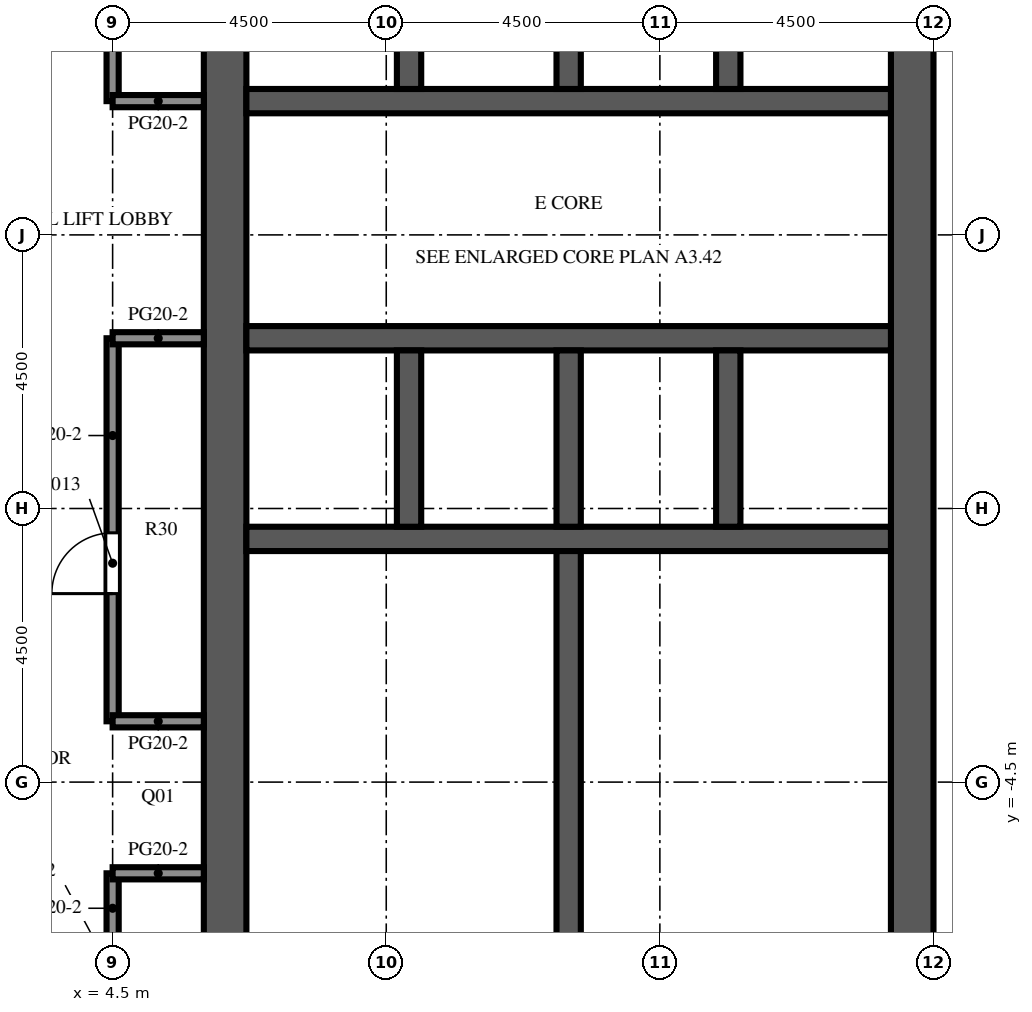
"""IFC4 building model, lengths in metres.
Left out: names, types, materials, properties, quantities, classifications, styles, units other than length and angle.
Written with IfcOpenShell. Run it as: python <this file> out.ifc"""

import sys

from ifc_helpers import new_model, si_unit, direction, frame, frame_2d, origin, place, context, subcontext, project, spatial, rectangle, extrude, element, fill, save


model = new_model("IFC4")
c1 = context("Model", 3, precision=1e-05, world=origin(), true_north=direction((0.0, 1.0)))
c2 = subcontext(c1, "Body", "Model", "MODEL_VIEW")
j1 = project(units=[si_unit("LENGTHUNIT", "METRE"), si_unit("PLANEANGLEUNIT", "RADIAN")], contexts=[c1])
p1 = place(None, origin())
s1 = spatial("IfcSite", under=j1, at=p1, CompositionType="ELEMENT")
p2 = place(p1, origin())
s2 = spatial("IfcBuilding", under=s1, at=p2, CompositionType="ELEMENT")
p3 = place(p2, frame((0.0, 0.0, 290.9)))
s3 = spatial("IfcBuildingStorey", under=s2, at=p3, CompositionType="ELEMENT", Elevation=290.9)
p4 = place(p3, frame((6.35, -9.0, 0.0), z_axis=(0.0, 0.0, 1.0), x_axis=(0.0, 1.0, 0.0)))
e1 = element("IfcWall", 1, at=p4, inside=s3, PredefinedType="SHEAR", context=c2, shape_type="SweptSolid", body=[
    extrude(rectangle(XDim=27.5, YDim=0.7, at=frame_2d((13.75, 0.0))), origin(), (0.0, 0.0, 1.0), 4.1),
])
p5 = place(p4, frame((12.55, 0.0, 0.0)))
e2 = element("IfcOpeningElement", 2, at=p5, cuts=e1, PredefinedType="OPENING", context=c2, shape_type="SweptSolid", body=[
    extrude(rectangle(XDim=2.4, YDim=2.4, at=frame_2d((1.2, 1.2))), frame((0.0, 0.36, 0.0), z_axis=(0.0, -1.0, 0.0), x_axis=(1.0, 0.0, 0.0)), (0.0, 0.0, 1.0), 0.72),
])
p6 = place(p4, frame((3.9, 0.0, 0.0)))
e3 = element("IfcOpeningElement", 3, at=p6, cuts=e1, PredefinedType="OPENING", context=c2, shape_type="SweptSolid", body=[
    extrude(rectangle(XDim=1.2, YDim=2.1, at=frame_2d((0.6, 1.05))), frame((0.0, 0.36, 0.0), z_axis=(0.0, -1.0, 0.0), x_axis=(1.0, 0.0, 0.0)), (0.0, 0.0, 1.0), 0.72),
])
p7 = place(p4, frame((22.4, 0.0, 0.0)))
e4 = element("IfcOpeningElement", 4, at=p7, cuts=e1, PredefinedType="OPENING", context=c2, shape_type="SweptSolid", body=[
    extrude(rectangle(XDim=1.2, YDim=2.1, at=frame_2d((0.6, 1.05))), frame((0.0, 0.36, 0.0), z_axis=(0.0, -1.0, 0.0), x_axis=(1.0, 0.0, 0.0)), (0.0, 0.0, 1.0), 0.72),
])
p8 = place(p3, frame((17.65, -9.0, 0.0), z_axis=(0.0, 0.0, 1.0), x_axis=(0.0, 1.0, 0.0)))
e5 = element("IfcWall", 5, at=p8, inside=s3, PredefinedType="SHEAR", context=c2, shape_type="SweptSolid", body=[
    extrude(rectangle(XDim=27.5, YDim=0.7, at=frame_2d((13.75, 0.0))), origin(), (0.0, 0.0, 1.0), 4.1),
])
p9 = place(p8, frame((12.55, 0.0, 0.0)))
e6 = element("IfcOpeningElement", 6, at=p9, cuts=e5, PredefinedType="OPENING", context=c2, shape_type="SweptSolid", body=[
    extrude(rectangle(XDim=2.4, YDim=2.4, at=frame_2d((1.2, 1.2))), frame((0.0, 0.36, 0.0), z_axis=(0.0, -1.0, 0.0), x_axis=(1.0, 0.0, 0.0)), (0.0, 0.0, 1.0), 0.72),
])
p10 = place(p8, frame((6.825, 0.0, 0.0)))
e7 = element("IfcOpeningElement", 7, at=p10, cuts=e5, PredefinedType="OPENING", context=c2, shape_type="SweptSolid", body=[
    extrude(rectangle(XDim=1.2, YDim=2.1, at=frame_2d((0.6, 1.05))), frame((0.0, 0.36, 0.0), z_axis=(0.0, -1.0, 0.0), x_axis=(1.0, 0.0, 0.0)), (0.0, 0.0, 1.0), 0.72),
])
p11 = place(p8, frame((19.475, 0.0, 0.0)))
e8 = element("IfcOpeningElement", 8, at=p11, cuts=e5, PredefinedType="OPENING", context=c2, shape_type="SweptSolid", body=[
    extrude(rectangle(XDim=1.2, YDim=2.1, at=frame_2d((0.6, 1.05))), frame((0.0, 0.36, 0.0), z_axis=(0.0, -1.0, 0.0), x_axis=(1.0, 0.0, 0.0)), (0.0, 0.0, 1.0), 0.72),
])
p12 = place(p3, frame((6.7, -0.5, 0.0), z_axis=(0.0, 0.0, 1.0), x_axis=(1.0, 0.0, 0.0)))
e9 = element("IfcWall", 9, at=p12, inside=s3, PredefinedType="SHEAR", context=c2, shape_type="SweptSolid", body=[
    extrude(rectangle(XDim=10.6, YDim=0.4, at=frame_2d((5.3, 0.0))), origin(), (0.0, 0.0, 1.0), 4.1),
])
p13 = place(p3, frame((6.7, 2.8, 0.0), z_axis=(0.0, 0.0, 1.0), x_axis=(1.0, 0.0, 0.0)))
e10 = element("IfcWall", 10, at=p13, inside=s3, PredefinedType="SHEAR", context=c2, shape_type="SweptSolid", body=[
    extrude(rectangle(XDim=10.6, YDim=0.4, at=frame_2d((5.3, 0.0))), origin(), (0.0, 0.0, 1.0), 4.1),
])
p14 = place(p13, frame((0.688, 0.0, 0.0)))
e11 = element("IfcOpeningElement", 11, at=p14, cuts=e10, PredefinedType="OPENING", context=c2, shape_type="SweptSolid", body=[
    extrude(rectangle(XDim=1.1, YDim=2.1, at=frame_2d((0.55, 1.05))), frame((0.0, 0.21, 0.0), z_axis=(0.0, -1.0, 0.0), x_axis=(1.0, 0.0, 0.0)), (0.0, 0.0, 1.0), 0.42),
])
p15 = place(p13, frame((3.438, 0.0, 0.0)))
e12 = element("IfcOpeningElement", 12, at=p15, cuts=e10, PredefinedType="OPENING", context=c2, shape_type="SweptSolid", body=[
    extrude(rectangle(XDim=1.1, YDim=2.1, at=frame_2d((0.55, 1.05))), frame((0.0, 0.21, 0.0), z_axis=(0.0, -1.0, 0.0), x_axis=(1.0, 0.0, 0.0)), (0.0, 0.0, 1.0), 0.42),
])
p16 = place(p13, frame((6.113, 0.0, 0.0)))
e13 = element("IfcOpeningElement", 13, at=p16, cuts=e10, PredefinedType="OPENING", context=c2, shape_type="SweptSolid", body=[
    extrude(rectangle(XDim=1.0, YDim=2.1, at=frame_2d((0.5, 1.05))), frame((0.0, 0.21, 0.0), z_axis=(0.0, -1.0, 0.0), x_axis=(1.0, 0.0, 0.0)), (0.0, 0.0, 1.0), 0.42),
])
p17 = place(p13, frame((8.863, 0.0, 0.0)))
e14 = element("IfcOpeningElement", 14, at=p17, cuts=e10, PredefinedType="OPENING", context=c2, shape_type="SweptSolid", body=[
    extrude(rectangle(XDim=1.0, YDim=2.1, at=frame_2d((0.5, 1.05))), frame((0.0, 0.21, 0.0), z_axis=(0.0, -1.0, 0.0), x_axis=(1.0, 0.0, 0.0)), (0.0, 0.0, 1.0), 0.42),
])
p18 = place(p3, frame((6.7, 6.7, 0.0), z_axis=(0.0, 0.0, 1.0), x_axis=(1.0, 0.0, 0.0)))
e15 = element("IfcWall", 15, at=p18, inside=s3, PredefinedType="SHEAR", context=c2, shape_type="SweptSolid", body=[
    extrude(rectangle(XDim=10.6, YDim=0.4, at=frame_2d((5.3, 0.0))), origin(), (0.0, 0.0, 1.0), 4.1),
])
p19 = place(p18, frame((3.438, 0.0, 0.0)))
e16 = element("IfcOpeningElement", 16, at=p19, cuts=e15, PredefinedType="OPENING", context=c2, shape_type="SweptSolid", body=[
    extrude(rectangle(XDim=1.1, YDim=2.1, at=frame_2d((0.55, 1.05))), frame((0.0, 0.21, 0.0), z_axis=(0.0, -1.0, 0.0), x_axis=(1.0, 0.0, 0.0)), (0.0, 0.0, 1.0), 0.42),
])
p20 = place(p18, frame((6.062, 0.0, 0.0)))
e17 = element("IfcOpeningElement", 17, at=p20, cuts=e15, PredefinedType="OPENING", context=c2, shape_type="SweptSolid", body=[
    extrude(rectangle(XDim=1.1, YDim=2.1, at=frame_2d((0.55, 1.05))), frame((0.0, 0.21, 0.0), z_axis=(0.0, -1.0, 0.0), x_axis=(1.0, 0.0, 0.0)), (0.0, 0.0, 1.0), 0.42),
])
p21 = place(p18, frame((8.812, 0.0, 0.0)))
e18 = element("IfcOpeningElement", 18, at=p21, cuts=e15, PredefinedType="OPENING", context=c2, shape_type="SweptSolid", body=[
    extrude(rectangle(XDim=1.1, YDim=2.1, at=frame_2d((0.55, 1.05))), frame((0.0, 0.21, 0.0), z_axis=(0.0, -1.0, 0.0), x_axis=(1.0, 0.0, 0.0)), (0.0, 0.0, 1.0), 0.42),
])
p22 = place(p18, frame((0.738, 0.0, 0.0)))
e19 = element("IfcOpeningElement", 19, at=p22, cuts=e15, PredefinedType="OPENING", context=c2, shape_type="SweptSolid", body=[
    extrude(rectangle(XDim=1.0, YDim=2.1, at=frame_2d((0.5, 1.05))), frame((0.0, 0.21, 0.0), z_axis=(0.0, -1.0, 0.0), x_axis=(1.0, 0.0, 0.0)), (0.0, 0.0, 1.0), 0.42),
])
for number, where, z_axis, x_axis in (
    (20, (9.375, -0.3, 0.0), (0.0, 0.0, 1.0), (0.0, 1.0, 0.0)),
    (21, (9.375, 6.9, 0.0), (0.0, 0.0, 1.0), (0.0, 1.0, 0.0)),
    (22, (12.0, -0.3, 0.0), (0.0, 0.0, 1.0), (0.0, 1.0, 0.0)),
    (23, (12.0, 6.9, 0.0), (0.0, 0.0, 1.0), (0.0, 1.0, 0.0)),
    (24, (14.625, -0.3, 0.0), (0.0, 0.0, 1.0), (0.0, 1.0, 0.0)),
    (25, (14.625, 6.9, 0.0), (0.0, 0.0, 1.0), (0.0, 1.0, 0.0)),
):
    element("IfcWall", number, at=place(p3, frame(where, z_axis=z_axis, x_axis=x_axis)), inside=s3, PredefinedType="SHEAR", context=c2, shape_type="SweptSolid", body=[
        extrude(rectangle(XDim=2.9, YDim=0.4, at=frame_2d((1.45, 0.0))), origin(), (0.0, 0.0, 1.0), 4.1),
    ])
p23 = place(p3, frame((12.0, -8.3, 0.0), z_axis=(0.0, 0.0, 1.0), x_axis=(0.0, 1.0, 0.0)))
e26 = element("IfcWall", 26, at=p23, inside=s3, PredefinedType="SHEAR", context=c2, shape_type="SweptSolid", body=[
    extrude(rectangle(XDim=7.6, YDim=0.4, at=frame_2d((3.8, 0.0))), origin(), (0.0, 0.0, 1.0), 4.1),
])
p24 = place(p3, frame((8.2, -8.3, 0.0), z_axis=(0.0, 0.0, 1.0), x_axis=(0.0, 1.0, 0.0)))
e27 = element("IfcWall", 27, at=p24, inside=s3, PredefinedType="PARTITIONING", context=c2, shape_type="SweptSolid", body=[
    extrude(rectangle(XDim=2.28, YDim=0.1, at=frame_2d((1.14, 0.0))), origin(), (0.0, 0.0, 1.0), 3.5),
])
p25 = place(p24, frame((0.64, 0.0, 0.0)))
e28 = element("IfcOpeningElement", 28, at=p25, cuts=e27, PredefinedType="OPENING", context=c2, shape_type="SweptSolid", body=[
    extrude(rectangle(XDim=1.0, YDim=2.1, at=frame_2d((0.5, 1.05))), frame((0.0, 0.06, 0.0), z_axis=(0.0, -1.0, 0.0), x_axis=(1.0, 0.0, 0.0)), (0.0, 0.0, 1.0), 0.12),
])
p26 = place(p3, frame((8.2, -6.02, 0.0), z_axis=(0.0, 0.0, 1.0), x_axis=(0.0, 1.0, 0.0)))
e29 = element("IfcWall", 29, at=p26, inside=s3, PredefinedType="PARTITIONING", context=c2, shape_type="SweptSolid", body=[
    extrude(rectangle(XDim=2.28, YDim=0.1, at=frame_2d((1.14, 0.0))), origin(), (0.0, 0.0, 1.0), 3.5),
])
p27 = place(p26, frame((0.64, 0.0, 0.0)))
e30 = element("IfcOpeningElement", 30, at=p27, cuts=e29, PredefinedType="OPENING", context=c2, shape_type="SweptSolid", body=[
    extrude(rectangle(XDim=1.0, YDim=2.1, at=frame_2d((0.5, 1.05))), frame((0.0, 0.06, 0.0), z_axis=(0.0, -1.0, 0.0), x_axis=(1.0, 0.0, 0.0)), (0.0, 0.0, 1.0), 0.12),
])
p28 = place(p3, frame((8.2, -3.74, 0.0), z_axis=(0.0, 0.0, 1.0), x_axis=(0.0, 1.0, 0.0)))
e31 = element("IfcWall", 31, at=p28, inside=s3, PredefinedType="PARTITIONING", context=c2, shape_type="SweptSolid", body=[
    extrude(rectangle(XDim=1.672, YDim=0.1, at=frame_2d((0.836, 0.0))), origin(), (0.0, 0.0, 1.0), 3.5),
])
p29 = place(p28, frame((0.336, 0.0, 0.0)))
e32 = element("IfcOpeningElement", 32, at=p29, cuts=e31, PredefinedType="OPENING", context=c2, shape_type="SweptSolid", body=[
    extrude(rectangle(XDim=1.0, YDim=2.1, at=frame_2d((0.5, 1.05))), frame((0.0, 0.06, 0.0), z_axis=(0.0, -1.0, 0.0), x_axis=(1.0, 0.0, 0.0)), (0.0, 0.0, 1.0), 0.12),
])
p30 = place(p3, frame((8.2, -2.068, 0.0), z_axis=(0.0, 0.0, 1.0), x_axis=(0.0, 1.0, 0.0)))
e33 = element("IfcWall", 33, at=p30, inside=s3, PredefinedType="PARTITIONING", context=c2, shape_type="SweptSolid", body=[
    extrude(rectangle(XDim=1.368, YDim=0.1, at=frame_2d((0.684, 0.0))), origin(), (0.0, 0.0, 1.0), 3.5),
])
p31 = place(p30, frame((0.2, 0.0, 0.0)))
e34 = element("IfcOpeningElement", 34, at=p31, cuts=e33, PredefinedType="OPENING", context=c2, shape_type="SweptSolid", body=[
    extrude(rectangle(XDim=0.968, YDim=2.1, at=frame_2d((0.484, 1.05))), frame((0.0, 0.06, 0.0), z_axis=(0.0, -1.0, 0.0), x_axis=(1.0, 0.0, 0.0)), (0.0, 0.0, 1.0), 0.12),
])
for number, where, z_axis, x_axis in (
    (35, (8.2, -6.02, 0.0), (0.0, 0.0, 1.0), (1.0, 0.0, 0.0)),
    (36, (8.2, -3.74, 0.0), (0.0, 0.0, 1.0), (1.0, 0.0, 0.0)),
    (37, (8.2, -2.068, 0.0), (0.0, 0.0, 1.0), (1.0, 0.0, 0.0)),
):
    element("IfcWall", number, at=place(p3, frame(where, z_axis=z_axis, x_axis=x_axis)), inside=s3, PredefinedType="PARTITIONING", context=c2, shape_type="SweptSolid", body=[
        extrude(rectangle(XDim=3.6, YDim=0.1, at=frame_2d((1.8, 0.0))), origin(), (0.0, 0.0, 1.0), 3.5),
    ])
p32 = place(p3, frame((4.5, -6.0, 0.0), z_axis=(0.0, 0.0, 1.0), x_axis=(0.0, -1.0, 0.0)))
e38 = element("IfcWall", 38, at=p32, inside=s3, PredefinedType="PARTITIONING", context=c2, shape_type="SweptSolid", body=[
    extrude(rectangle(XDim=2.5, YDim=0.2, at=frame_2d((1.25, 0.0))), origin(), (0.0, 0.0, 1.0), 3.5),
])
p33 = place(p32, frame((1.15, 0.0, 0.0)))
e39 = element("IfcOpeningElement", 39, at=p33, cuts=e38, PredefinedType="OPENING", context=c2, shape_type="SweptSolid", body=[
    extrude(rectangle(XDim=1.0, YDim=2.1, at=frame_2d((0.5, 1.05))), frame((0.0, 0.11, 0.0), z_axis=(0.0, -1.0, 0.0), x_axis=(1.0, 0.0, 0.0)), (0.0, 0.0, 1.0), 0.22),
])
p34 = place(p3, frame((4.5, 2.8, 0.0), z_axis=(0.0, 0.0, 1.0), x_axis=(0.0, -1.0, 0.0)))
e40 = element("IfcWall", 40, at=p34, inside=s3, PredefinedType="PARTITIONING", context=c2, shape_type="SweptSolid", body=[
    extrude(rectangle(XDim=6.3, YDim=0.2, at=frame_2d((3.15, 0.0))), origin(), (0.0, 0.0, 1.0), 3.5),
])
p35 = place(p34, frame((3.2, 0.0, 0.0)))
e41 = element("IfcOpeningElement", 41, at=p35, cuts=e40, PredefinedType="OPENING", context=c2, shape_type="SweptSolid", body=[
    extrude(rectangle(XDim=1.0, YDim=2.1, at=frame_2d((0.5, 1.05))), frame((0.0, 0.11, 0.0), z_axis=(0.0, -1.0, 0.0), x_axis=(1.0, 0.0, 0.0)), (0.0, 0.0, 1.0), 0.22),
])
p36 = place(p3, frame((4.5, 18.5, 0.0), z_axis=(0.0, 0.0, 1.0), x_axis=(0.0, -1.0, 0.0)))
e42 = element("IfcWall", 42, at=p36, inside=s3, PredefinedType="PARTITIONING", context=c2, shape_type="SweptSolid", body=[
    extrude(rectangle(XDim=11.8, YDim=0.2, at=frame_2d((5.9, 0.0))), origin(), (0.0, 0.0, 1.0), 3.5),
])
p37 = place(p36, frame((3.95, 0.0, 0.0)))
e43 = element("IfcOpeningElement", 43, at=p37, cuts=e42, PredefinedType="OPENING", context=c2, shape_type="SweptSolid", body=[
    extrude(rectangle(XDim=1.0, YDim=2.1, at=frame_2d((0.5, 1.05))), frame((0.0, 0.11, 0.0), z_axis=(0.0, -1.0, 0.0), x_axis=(1.0, 0.0, 0.0)), (0.0, 0.0, 1.0), 0.22),
])
for number, where, z_axis, x_axis in (
    (44, (4.5, -6.0, 0.0), (0.0, 0.0, 1.0), (1.0, 0.0, 0.0)),
    (45, (4.5, -3.5, 0.0), (0.0, 0.0, 1.0), (1.0, 0.0, 0.0)),
    (46, (4.5, 2.8, 0.0), (0.0, 0.0, 1.0), (1.0, 0.0, 0.0)),
    (47, (4.5, 6.7, 0.0), (0.0, 0.0, 1.0), (1.0, 0.0, 0.0)),
):
    element("IfcWall", number, at=place(p3, frame(where, z_axis=z_axis, x_axis=x_axis)), inside=s3, PredefinedType="PARTITIONING", context=c2, shape_type="SweptSolid", body=[
        extrude(rectangle(XDim=1.5, YDim=0.2, at=frame_2d((0.75, 0.0))), origin(), (0.0, 0.0, 1.0), 3.5),
    ])
p38 = place(p14, origin())
e48 = element("IfcDoor", 48, at=p38, inside=s3, OperationType="DOUBLE_DOOR_SLIDING", PredefinedType="DOOR", context=c2, shape_type="SweptSolid", body=[
    extrude(rectangle(XDim=1.1, YDim=2.1, at=frame_2d((0.55, 1.05))), frame((0.0, 0.025, 0.0), z_axis=(0.0, -1.0, 0.0), x_axis=(1.0, 0.0, 0.0)), (0.0, 0.0, 1.0), 0.05),
])
fill(e11, e48)
p39 = place(p15, origin())
e49 = element("IfcDoor", 49, at=p39, inside=s3, OperationType="DOUBLE_DOOR_SLIDING", PredefinedType="DOOR", context=c2, shape_type="SweptSolid", body=[
    extrude(rectangle(XDim=1.1, YDim=2.1, at=frame_2d((0.55, 1.05))), frame((0.0, 0.025, 0.0), z_axis=(0.0, -1.0, 0.0), x_axis=(1.0, 0.0, 0.0)), (0.0, 0.0, 1.0), 0.05),
])
fill(e12, e49)
p40 = place(p19, origin())
e50 = element("IfcDoor", 50, at=p40, inside=s3, OperationType="DOUBLE_DOOR_SLIDING", PredefinedType="DOOR", context=c2, shape_type="SweptSolid", body=[
    extrude(rectangle(XDim=1.1, YDim=2.1, at=frame_2d((0.55, 1.05))), frame((0.0, 0.025, 0.0), z_axis=(0.0, -1.0, 0.0), x_axis=(1.0, 0.0, 0.0)), (0.0, 0.0, 1.0), 0.05),
])
fill(e16, e50)
p41 = place(p20, origin())
e51 = element("IfcDoor", 51, at=p41, inside=s3, OperationType="DOUBLE_DOOR_SLIDING", PredefinedType="DOOR", context=c2, shape_type="SweptSolid", body=[
    extrude(rectangle(XDim=1.1, YDim=2.1, at=frame_2d((0.55, 1.05))), frame((0.0, 0.025, 0.0), z_axis=(0.0, -1.0, 0.0), x_axis=(1.0, 0.0, 0.0)), (0.0, 0.0, 1.0), 0.05),
])
fill(e17, e51)
p42 = place(p21, origin())
e52 = element("IfcDoor", 52, at=p42, inside=s3, OperationType="DOUBLE_DOOR_SLIDING", PredefinedType="DOOR", context=c2, shape_type="SweptSolid", body=[
    extrude(rectangle(XDim=1.1, YDim=2.1, at=frame_2d((0.55, 1.05))), frame((0.0, 0.025, 0.0), z_axis=(0.0, -1.0, 0.0), x_axis=(1.0, 0.0, 0.0)), (0.0, 0.0, 1.0), 0.05),
])
fill(e18, e52)
p43 = place(p5, origin())
e53 = element("IfcDoor", 53, at=p43, inside=s3, OperationType="DOUBLE_DOOR_DOUBLE_SWING", PredefinedType="DOOR", context=c2, shape_type="SweptSolid", body=[
    extrude(rectangle(XDim=2.4, YDim=2.4, at=frame_2d((1.2, 1.2))), frame((0.0, 0.025, 0.0), z_axis=(0.0, -1.0, 0.0), x_axis=(1.0, 0.0, 0.0)), (0.0, 0.0, 1.0), 0.05),
])
fill(e2, e53)
p44 = place(p9, origin())
e54 = element("IfcDoor", 54, at=p44, inside=s3, OperationType="DOUBLE_DOOR_DOUBLE_SWING", PredefinedType="DOOR", context=c2, shape_type="SweptSolid", body=[
    extrude(rectangle(XDim=2.4, YDim=2.4, at=frame_2d((1.2, 1.2))), frame((0.0, 0.025, 0.0), z_axis=(0.0, -1.0, 0.0), x_axis=(1.0, 0.0, 0.0)), (0.0, 0.0, 1.0), 0.05),
])
fill(e6, e54)
p45 = place(p10, frame((1.2, 0.0, 0.0), z_axis=(0.0, 0.0, 1.0), x_axis=(-1.0, 0.0, 0.0)))
e55 = element("IfcDoor", 55, at=p45, inside=s3, OperationType="SINGLE_SWING_LEFT", PredefinedType="DOOR", context=c2, shape_type="SweptSolid", body=[
    extrude(rectangle(XDim=1.2, YDim=2.1, at=frame_2d((0.6, 1.05))), frame((0.0, 0.025, 0.0), z_axis=(0.0, -1.0, 0.0), x_axis=(1.0, 0.0, 0.0)), (0.0, 0.0, 1.0), 0.05),
])
fill(e7, e55)
p46 = place(p16, origin())
e56 = element("IfcDoor", 56, at=p46, inside=s3, OperationType="SINGLE_SWING_LEFT", PredefinedType="DOOR", context=c2, shape_type="SweptSolid", body=[
    extrude(rectangle(XDim=1.0, YDim=2.1, at=frame_2d((0.5, 1.05))), frame((0.0, 0.025, 0.0), z_axis=(0.0, -1.0, 0.0), x_axis=(1.0, 0.0, 0.0)), (0.0, 0.0, 1.0), 0.05),
])
fill(e13, e56)
p47 = place(p17, origin())
e57 = element("IfcDoor", 57, at=p47, inside=s3, OperationType="SINGLE_SWING_RIGHT", PredefinedType="DOOR", context=c2, shape_type="SweptSolid", body=[
    extrude(rectangle(XDim=1.0, YDim=2.1, at=frame_2d((0.5, 1.05))), frame((0.0, 0.025, 0.0), z_axis=(0.0, -1.0, 0.0), x_axis=(1.0, 0.0, 0.0)), (0.0, 0.0, 1.0), 0.05),
])
fill(e14, e57)
p48 = place(p22, origin())
e58 = element("IfcDoor", 58, at=p48, inside=s3, OperationType="SINGLE_SWING_LEFT", PredefinedType="DOOR", context=c2, shape_type="SweptSolid", body=[
    extrude(rectangle(XDim=1.0, YDim=2.1, at=frame_2d((0.5, 1.05))), frame((0.0, 0.025, 0.0), z_axis=(0.0, -1.0, 0.0), x_axis=(1.0, 0.0, 0.0)), (0.0, 0.0, 1.0), 0.05),
])
fill(e19, e58)
p49 = place(p6, origin())
e59 = element("IfcDoor", 59, at=p49, inside=s3, OperationType="SINGLE_SWING_RIGHT", PredefinedType="DOOR", context=c2, shape_type="SweptSolid", body=[
    extrude(rectangle(XDim=1.2, YDim=2.1, at=frame_2d((0.6, 1.05))), frame((0.0, -0.275, 0.0), z_axis=(0.0, -1.0, 0.0), x_axis=(1.0, 0.0, 0.0)), (0.0, 0.0, 1.0), 0.05),
])
fill(e3, e59)
p50 = place(p25, origin())
e60 = element("IfcDoor", 60, at=p50, inside=s3, OperationType="SINGLE_SWING_LEFT", PredefinedType="DOOR", context=c2, shape_type="SweptSolid", body=[
    extrude(rectangle(XDim=1.0, YDim=2.1, at=frame_2d((0.5, 1.05))), frame((0.0, 0.025, 0.0), z_axis=(0.0, -1.0, 0.0), x_axis=(1.0, 0.0, 0.0)), (0.0, 0.0, 1.0), 0.05),
])
fill(e28, e60)
p51 = place(p27, origin())
e61 = element("IfcDoor", 61, at=p51, inside=s3, OperationType="SINGLE_SWING_RIGHT", PredefinedType="DOOR", context=c2, shape_type="SweptSolid", body=[
    extrude(rectangle(XDim=1.0, YDim=2.1, at=frame_2d((0.5, 1.05))), frame((0.0, 0.025, 0.0), z_axis=(0.0, -1.0, 0.0), x_axis=(1.0, 0.0, 0.0)), (0.0, 0.0, 1.0), 0.05),
])
fill(e30, e61)
p52 = place(p29, origin())
e62 = element("IfcDoor", 62, at=p52, inside=s3, OperationType="SINGLE_SWING_LEFT", PredefinedType="DOOR", context=c2, shape_type="SweptSolid", body=[
    extrude(rectangle(XDim=1.0, YDim=2.1, at=frame_2d((0.5, 1.05))), frame((0.0, 0.025, 0.0), z_axis=(0.0, -1.0, 0.0), x_axis=(1.0, 0.0, 0.0)), (0.0, 0.0, 1.0), 0.05),
])
fill(e32, e62)
p53 = place(p31, origin())
e63 = element("IfcDoor", 63, at=p53, inside=s3, OperationType="SINGLE_SWING_RIGHT", PredefinedType="DOOR", context=c2, shape_type="SweptSolid", body=[
    extrude(rectangle(XDim=0.968, YDim=2.1, at=frame_2d((0.484, 1.05))), frame((0.0, 0.025, 0.0), z_axis=(0.0, -1.0, 0.0), x_axis=(1.0, 0.0, 0.0)), (0.0, 0.0, 1.0), 0.05),
])
fill(e34, e63)
p54 = place(p35, origin())
e64 = element("IfcDoor", 64, at=p54, inside=s3, OperationType="SINGLE_SWING_RIGHT", PredefinedType="DOOR", context=c2, shape_type="SweptSolid", body=[
    extrude(rectangle(XDim=1.0, YDim=2.1, at=frame_2d((0.5, 1.05))), frame((0.0, 0.025, 0.0), z_axis=(0.0, -1.0, 0.0), x_axis=(1.0, 0.0, 0.0)), (0.0, 0.0, 1.0), 0.05),
])
fill(e41, e64)
save(model, sys.argv[1])
